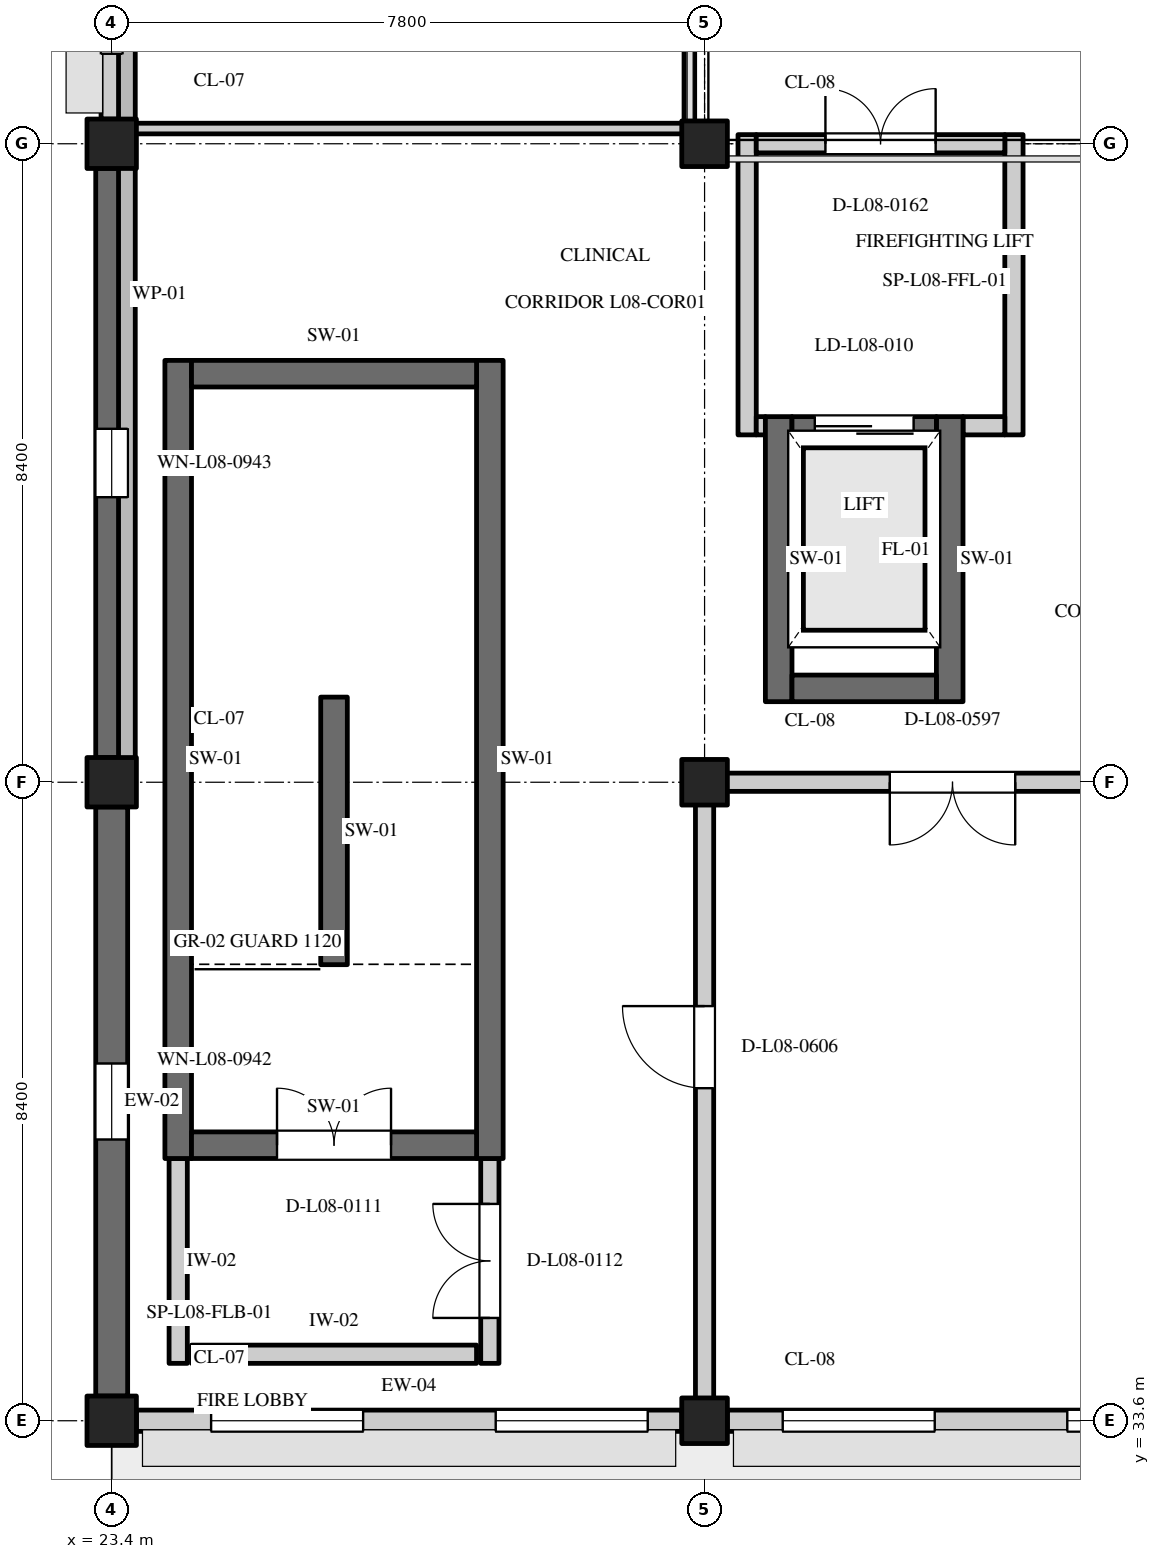
"""IFC4 building model, lengths in metres.
Left out: names, types, materials, properties, quantities, classifications, styles, units other than length and angle.
Written with IfcOpenShell. Run it as: python <this file> out.ifc"""

import sys

from ifc_helpers import new_model, si_unit, direction, frame, frame_2d, origin, origin_2d, place, context, subcontext, project, spatial, rectangle, extrude, element, fill, save


model = new_model("IFC4")
c1 = context("Model", 3, precision=1e-05, world=origin(), true_north=direction((0.0, 1.0)))
c2 = subcontext(c1, "Body", "Model", "MODEL_VIEW")
j1 = project(units=[si_unit("LENGTHUNIT", "METRE"), si_unit("PLANEANGLEUNIT", "RADIAN")], contexts=[c1])
p1 = place(None, origin())
s1 = spatial("IfcSite", under=j1, at=p1, CompositionType="ELEMENT")
p2 = place(p1, origin())
s2 = spatial("IfcBuilding", under=s1, at=p2, CompositionType="ELEMENT")
p3 = place(p2, frame((0.0, 0.0, 33.9)))
s3 = spatial("IfcBuildingStorey", under=s2, at=p3, CompositionType="ELEMENT", Elevation=33.9)
for number, where, z_axis, x_axis in (
    (1, (23.4, 33.6, 0.0), (0.0, 0.0, 1.0), (1.0, 0.0, 0.0)),
    (2, (23.4, 42.0, 0.0), (0.0, 0.0, 1.0), (1.0, 0.0, 0.0)),
    (3, (23.4, 50.4, 0.0), (0.0, 0.0, 1.0), (1.0, 0.0, 0.0)),
):
    element("IfcColumn", number, at=place(p3, frame(where, z_axis=z_axis, x_axis=x_axis)), inside=s3, PredefinedType="COLUMN", context=c2, shape_type="SweptSolid", body=[
        extrude(rectangle(XDim=0.65, YDim=0.65, at=origin_2d()), origin(), (0.0, 0.0, 1.0), 3.9),
    ])
for number, where, z_axis, x_axis in (
    (4, (31.2, 33.6, 0.0), (0.0, 0.0, 1.0), (1.0, 0.0, 0.0)),
    (5, (31.2, 42.0, 0.0), (0.0, 0.0, 1.0), (1.0, 0.0, 0.0)),
    (6, (31.2, 50.4, 0.0), (0.0, 0.0, 1.0), (1.0, 0.0, 0.0)),
):
    element("IfcColumn", number, at=place(p3, frame(where, z_axis=z_axis, x_axis=x_axis)), inside=s3, PredefinedType="COLUMN", context=c2, shape_type="SweptSolid", body=[
        extrude(rectangle(XDim=0.6, YDim=0.6, at=origin_2d()), origin(), (0.0, 0.0, 1.0), 3.9),
    ])
p4 = place(p3, frame((23.725, 33.6, 0.0), z_axis=(0.0, 0.0, 1.0), x_axis=(1.0, 0.0, 0.0)))
e7 = element("IfcWall", 7, at=p4, inside=s3, PredefinedType="STANDARD", context=c2, shape_type="SweptSolid", body=[
    extrude(rectangle(XDim=7.175, YDim=0.28, at=frame_2d((3.587, 0.0))), origin(), (0.0, 0.0, 1.0), 2.95),
])
p5 = place(p4, frame((0.983, 0.0, 0.8)))
e8 = element("IfcOpeningElement", 8, at=p5, cuts=e7, PredefinedType="OPENING", context=c2, shape_type="SweptSolid", body=[
    extrude(rectangle(XDim=2.0, YDim=1.75, at=frame_2d((1.0, 0.875))), frame((0.0, 0.152, 0.0), z_axis=(0.0, -1.0, 0.0), x_axis=(1.0, 0.0, 0.0)), (0.0, 0.0, 1.0), 0.304),
])
p6 = place(p4, frame((4.727, 0.0, 0.8)))
e9 = element("IfcOpeningElement", 9, at=p6, cuts=e7, PredefinedType="OPENING", context=c2, shape_type="SweptSolid", body=[
    extrude(rectangle(XDim=2.0, YDim=1.75, at=frame_2d((1.0, 0.875))), frame((0.0, 0.152, 0.0), z_axis=(0.0, -1.0, 0.0), x_axis=(1.0, 0.0, 0.0)), (0.0, 0.0, 1.0), 0.304),
])
p7 = place(p3, frame((31.5, 33.6, 0.0), z_axis=(0.0, 0.0, 1.0), x_axis=(1.0, 0.0, 0.0)))
e10 = element("IfcWall", 10, at=p7, inside=s3, PredefinedType="STANDARD", context=c2, shape_type="SweptSolid", body=[
    extrude(rectangle(XDim=7.2, YDim=0.28, at=frame_2d((3.6, 0.0))), origin(), (0.0, 0.0, 1.0), 2.95),
])
p8 = place(p7, frame((0.728, 0.0, 0.8)))
e11 = element("IfcOpeningElement", 11, at=p8, cuts=e10, PredefinedType="OPENING", context=c2, shape_type="SweptSolid", body=[
    extrude(rectangle(XDim=2.0, YDim=1.65, at=frame_2d((1.0, 0.825))), frame((0.0, 0.152, 0.0), z_axis=(0.0, -1.0, 0.0), x_axis=(1.0, 0.0, 0.0)), (0.0, 0.0, 1.0), 0.304),
])
p9 = place(p7, frame((4.472, 0.0, 0.8)))
e12 = element("IfcOpeningElement", 12, at=p9, cuts=e10, PredefinedType="OPENING", context=c2, shape_type="SweptSolid", body=[
    extrude(rectangle(XDim=2.0, YDim=1.65, at=frame_2d((1.0, 0.825))), frame((0.0, 0.152, 0.0), z_axis=(0.0, -1.0, 0.0), x_axis=(1.0, 0.0, 0.0)), (0.0, 0.0, 1.0), 0.304),
])
p10 = place(p3, frame((23.4, 33.925, 0.0), z_axis=(0.0, 0.0, 1.0), x_axis=(0.0, 1.0, 0.0)))
e13 = element("IfcWall", 13, at=p10, inside=s3, PredefinedType="SOLIDWALL", context=c2, shape_type="SweptSolid", body=[
    extrude(rectangle(XDim=7.75, YDim=0.42, at=frame_2d((3.875, 0.0))), origin(), (0.0, 0.0, 1.0), 2.95),
])
p11 = place(p10, frame((3.375, 0.0, 0.8)))
e14 = element("IfcOpeningElement", 14, at=p11, cuts=e13, PredefinedType="OPENING", context=c2, shape_type="SweptSolid", body=[
    extrude(rectangle(XDim=1.0, YDim=1.45, at=frame_2d((0.5, 0.725))), frame((0.0, 0.222, 0.0), z_axis=(0.0, -1.0, 0.0), x_axis=(1.0, 0.0, 0.0)), (0.0, 0.0, 1.0), 0.444),
])
p12 = place(p3, frame((23.4, 42.325, 0.0), z_axis=(0.0, 0.0, 1.0), x_axis=(0.0, 1.0, 0.0)))
e15 = element("IfcWall", 15, at=p12, inside=s3, PredefinedType="SOLIDWALL", context=c2, shape_type="SweptSolid", body=[
    extrude(rectangle(XDim=7.75, YDim=0.42, at=frame_2d((3.875, 0.0))), origin(), (0.0, 0.0, 1.0), 2.95),
])
p13 = place(p12, frame((3.425, 0.0, 0.8)))
e16 = element("IfcOpeningElement", 16, at=p13, cuts=e15, PredefinedType="OPENING", context=c2, shape_type="SweptSolid", body=[
    extrude(rectangle(XDim=0.9, YDim=1.3, at=frame_2d((0.45, 0.65))), frame((0.0, 0.222, 0.0), z_axis=(0.0, -1.0, 0.0), x_axis=(1.0, 0.0, 0.0)), (0.0, 0.0, 1.0), 0.444),
])
p14 = place(p3, frame((23.4, 50.725, 0.0), z_axis=(0.0, 0.0, 1.0), x_axis=(0.0, 1.0, 0.0)))
e17 = element("IfcWall", 17, at=p14, inside=s3, PredefinedType="STANDARD", context=c2, shape_type="SweptSolid", body=[
    extrude(rectangle(XDim=7.75, YDim=0.28, at=frame_2d((3.875, 0.0))), origin(), (0.0, 0.0, 1.0), 2.95),
])
p15 = place(p14, frame((0.859, 0.0, 0.8)))
e18 = element("IfcOpeningElement", 18, at=p15, cuts=e17, PredefinedType="OPENING", context=c2, shape_type="SweptSolid", body=[
    extrude(rectangle(XDim=2.0, YDim=1.55, at=frame_2d((1.0, 0.775))), frame((0.0, 0.152, 0.0), z_axis=(0.0, -1.0, 0.0), x_axis=(1.0, 0.0, 0.0)), (0.0, 0.0, 1.0), 0.304),
])
p16 = place(p14, frame((4.891, 0.0, 0.8)))
e19 = element("IfcOpeningElement", 19, at=p16, cuts=e17, PredefinedType="OPENING", context=c2, shape_type="SweptSolid", body=[
    extrude(rectangle(XDim=2.0, YDim=1.55, at=frame_2d((1.0, 0.775))), frame((0.0, 0.152, 0.0), z_axis=(0.0, -1.0, 0.0), x_axis=(1.0, 0.0, 0.0)), (0.0, 0.0, 1.0), 0.304),
])
p17 = place(p3, frame((23.6, 42.2, 3.9), z_axis=(0.0, 0.0, 1.0), x_axis=(0.0, 1.0, 0.0)))
e20 = element("IfcWall", 20, at=p17, inside=s3, PredefinedType="PARAPET", context=c2, shape_type="SweptSolid", body=[
    extrude(rectangle(XDim=16.4, YDim=0.22, at=frame_2d((8.2, 0.0))), origin(), (0.0, 0.0, 1.0), 1.15),
])
for number, where, z_axis, x_axis in (
    (21, (24.275, 37.05, 0.0), (0.0, 0.0, 1.0), (0.0, 1.0, 0.0)),
    (22, (28.375, 37.05, 0.0), (0.0, 0.0, 1.0), (0.0, 1.0, 0.0)),
):
    element("IfcWall", number, at=place(p3, frame(where, z_axis=z_axis, x_axis=x_axis)), inside=s3, PredefinedType="SHEAR", context=c2, shape_type="SweptSolid", body=[
        extrude(rectangle(XDim=10.5, YDim=0.35, at=frame_2d((5.25, 0.0))), origin(), (0.0, 0.0, 1.0), 3.6),
    ])
p18 = place(p3, frame((24.45, 47.375, 0.0), z_axis=(0.0, 0.0, 1.0), x_axis=(1.0, 0.0, 0.0)))
e23 = element("IfcWall", 23, at=p18, inside=s3, PredefinedType="SHEAR", context=c2, shape_type="SweptSolid", body=[
    extrude(rectangle(XDim=3.75, YDim=0.35, at=frame_2d((1.875, 0.0))), origin(), (0.0, 0.0, 1.0), 3.6),
])
p19 = place(p3, frame((24.45, 37.225, 0.0), z_axis=(0.0, 0.0, 1.0), x_axis=(1.0, 0.0, 0.0)))
e24 = element("IfcWall", 24, at=p19, inside=s3, PredefinedType="SHEAR", context=c2, shape_type="SweptSolid", body=[
    extrude(rectangle(XDim=3.75, YDim=0.35, at=frame_2d((1.875, 0.0))), origin(), (0.0, 0.0, 1.0), 3.6),
])
p20 = place(p19, frame((1.125, 0.0, 0.0)))
e25 = element("IfcOpeningElement", 25, at=p20, cuts=e24, PredefinedType="OPENING", context=c2, shape_type="SweptSolid", body=[
    extrude(rectangle(XDim=1.5, YDim=2.2, at=frame_2d((0.75, 1.1))), frame((0.0, 0.187, 0.0), z_axis=(0.0, -1.0, 0.0), x_axis=(1.0, 0.0, 0.0)), (0.0, 0.0, 1.0), 0.374),
])
p21 = place(p3, frame((24.275, 34.355, 0.0), z_axis=(0.0, 0.0, 1.0), x_axis=(0.0, 1.0, 0.0)))
e26 = element("IfcWall", 26, at=p21, inside=s3, PredefinedType="STANDARD", context=c2, shape_type="SweptSolid", body=[
    extrude(rectangle(XDim=2.695, YDim=0.24, at=frame_2d((1.348, 0.0))), origin(), (0.0, 0.0, 1.0), 3.6),
])
p22 = place(p3, frame((28.375, 34.355, 0.0), z_axis=(0.0, 0.0, 1.0), x_axis=(0.0, 1.0, 0.0)))
e27 = element("IfcWall", 27, at=p22, inside=s3, PredefinedType="STANDARD", context=c2, shape_type="SweptSolid", body=[
    extrude(rectangle(XDim=2.695, YDim=0.24, at=frame_2d((1.348, 0.0))), origin(), (0.0, 0.0, 1.0), 3.6),
])
p23 = place(p22, frame((0.597, 0.0, 0.0)))
e28 = element("IfcOpeningElement", 28, at=p23, cuts=e27, PredefinedType="OPENING", context=c2, shape_type="SweptSolid", body=[
    extrude(rectangle(XDim=1.5, YDim=2.2, at=frame_2d((0.75, 1.1))), frame((0.0, 0.132, 0.0), z_axis=(0.0, -1.0, 0.0), x_axis=(1.0, 0.0, 0.0)), (0.0, 0.0, 1.0), 0.264),
])
p24 = place(p3, frame((24.45, 34.475, 0.0), z_axis=(0.0, 0.0, 1.0), x_axis=(1.0, 0.0, 0.0)))
e29 = element("IfcWall", 29, at=p24, inside=s3, PredefinedType="STANDARD", context=c2, shape_type="SweptSolid", body=[
    extrude(rectangle(XDim=3.75, YDim=0.24, at=frame_2d((1.875, 0.0))), origin(), (0.0, 0.0, 1.0), 3.6),
])
p25 = place(p3, frame((26.325, 39.6, 0.0), z_axis=(0.0, 0.0, 1.0), x_axis=(0.0, 1.0, 0.0)))
e30 = element("IfcWall", 30, at=p25, inside=s3, PredefinedType="SHEAR", context=c2, shape_type="SweptSolid", body=[
    extrude(rectangle(XDim=3.52, YDim=0.35, at=frame_2d((1.76, 0.0))), origin(), (0.0, 0.0, 1.0), 3.6),
])
for number, where, z_axis, x_axis in (
    (31, (32.175, 43.06, 0.0), (0.0, 0.0, 1.0), (0.0, 1.0, 0.0)),
    (32, (34.425, 43.06, 0.0), (0.0, 0.0, 1.0), (0.0, 1.0, 0.0)),
):
    element("IfcWall", number, at=place(p3, frame(where, z_axis=z_axis, x_axis=x_axis)), inside=s3, PredefinedType="SHEAR", context=c2, shape_type="SweptSolid", body=[
        extrude(rectangle(XDim=3.75, YDim=0.35, at=frame_2d((1.875, 0.0))), origin(), (0.0, 0.0, 1.0), 3.6),
    ])
p26 = place(p3, frame((32.35, 43.235, 0.0), z_axis=(0.0, 0.0, 1.0), x_axis=(1.0, 0.0, 0.0)))
e33 = element("IfcWall", 33, at=p26, inside=s3, PredefinedType="SHEAR", context=c2, shape_type="SweptSolid", body=[
    extrude(rectangle(XDim=1.9, YDim=0.35, at=frame_2d((0.95, 0.0))), origin(), (0.0, 0.0, 1.0), 3.6),
])
p27 = place(p3, frame((32.35, 46.635, 0.0), z_axis=(0.0, 0.0, 1.0), x_axis=(1.0, 0.0, 0.0)))
e34 = element("IfcWall", 34, at=p27, inside=s3, PredefinedType="SHEAR", context=c2, shape_type="SweptSolid", body=[
    extrude(rectangle(XDim=1.9, YDim=0.35, at=frame_2d((0.95, 0.0))), origin(), (0.0, 0.0, 1.0), 3.6),
])
p28 = place(p27, frame((0.3, 0.0, 0.0)))
e35 = element("IfcOpeningElement", 35, at=p28, cuts=e34, PredefinedType="OPENING", context=c2, shape_type="SweptSolid", body=[
    extrude(rectangle(XDim=1.3, YDim=2.2, at=frame_2d((0.65, 1.1))), frame((0.0, 0.187, 0.0), z_axis=(0.0, -1.0, 0.0), x_axis=(1.0, 0.0, 0.0)), (0.0, 0.0, 1.0), 0.374),
])
for number, where, z_axis, x_axis in (
    (36, (31.76, 46.57, 0.0), (0.0, 0.0, 1.0), (0.0, 1.0, 0.0)),
    (37, (35.27, 46.57, 0.0), (0.0, 0.0, 1.0), (0.0, 1.0, 0.0)),
):
    element("IfcWall", number, at=place(p3, frame(where, z_axis=z_axis, x_axis=x_axis)), inside=s3, PredefinedType="STANDARD", context=c2, shape_type="SweptSolid", body=[
        extrude(rectangle(XDim=3.95, YDim=0.24, at=frame_2d((1.975, 0.0))), origin(), (0.0, 0.0, 1.0), 3.1),
    ])
p29 = place(p3, frame((31.88, 46.69, 0.0), z_axis=(0.0, 0.0, 1.0), x_axis=(1.0, 0.0, 0.0)))
e38 = element("IfcWall", 38, at=p29, inside=s3, PredefinedType="STANDARD", context=c2, shape_type="SweptSolid", body=[
    extrude(rectangle(XDim=0.12, YDim=0.24, at=frame_2d((0.06, 0.0))), origin(), (0.0, 0.0, 1.0), 3.1),
])
p30 = place(p3, frame((34.6, 46.69, 0.0), z_axis=(0.0, 0.0, 1.0), x_axis=(1.0, 0.0, 0.0)))
e39 = element("IfcWall", 39, at=p30, inside=s3, PredefinedType="STANDARD", context=c2, shape_type="SweptSolid", body=[
    extrude(rectangle(XDim=0.55, YDim=0.24, at=frame_2d((0.275, 0.0))), origin(), (0.0, 0.0, 1.0), 3.1),
])
p31 = place(p3, frame((31.88, 50.4, 0.0), z_axis=(0.0, 0.0, 1.0), x_axis=(1.0, 0.0, 0.0)))
e40 = element("IfcWall", 40, at=p31, inside=s3, PredefinedType="STANDARD", context=c2, shape_type="SweptSolid", body=[
    extrude(rectangle(XDim=3.27, YDim=0.24, at=frame_2d((1.635, 0.0))), origin(), (0.0, 0.0, 1.0), 3.1),
])
p32 = place(p31, frame((0.91, 0.0, 0.0)))
e41 = element("IfcOpeningElement", 41, at=p32, cuts=e40, PredefinedType="OPENING", context=c2, shape_type="SweptSolid", body=[
    extrude(rectangle(XDim=1.45, YDim=2.2, at=frame_2d((0.725, 1.1))), frame((0.0, 0.132, 0.0), z_axis=(0.0, -1.0, 0.0), x_axis=(1.0, 0.0, 0.0)), (0.0, 0.0, 1.0), 0.264),
])
p33 = place(p3, frame((31.0, 50.685, 0.0), z_axis=(0.0, 0.0, 1.0), x_axis=(0.0, 1.0, 0.0)))
e42 = element("IfcWall", 42, at=p33, inside=s3, PredefinedType="PARTITIONING", context=c2, shape_type="SweptSolid", body=[
    extrude(rectangle(XDim=3.36, YDim=0.14, at=frame_2d((1.68, 0.0))), origin(), (0.0, 0.0, 1.0), 3.58),
])
p34 = place(p33, frame((1.89, 0.0, 0.0)))
e43 = element("IfcOpeningElement", 43, at=p34, cuts=e42, PredefinedType="OPENING", context=c2, shape_type="SweptSolid", body=[
    extrude(rectangle(XDim=1.22, YDim=2.15, at=frame_2d((0.61, 1.075))), frame((0.0, 0.082, 0.0), z_axis=(0.0, -1.0, 0.0), x_axis=(1.0, 0.0, 0.0)), (0.0, 0.0, 1.0), 0.164),
])
p35 = place(p3, frame((23.485, 50.6, 0.0), z_axis=(0.0, 0.0, 1.0), x_axis=(1.0, 0.0, 0.0)))
e44 = element("IfcWall", 44, at=p35, inside=s3, PredefinedType="PARTITIONING", context=c2, shape_type="SweptSolid", body=[
    extrude(rectangle(XDim=7.43, YDim=0.14, at=frame_2d((3.715, 0.0))), origin(), (0.0, 0.0, 1.0), 2.95),
])
p36 = place(p3, frame((31.31, 42.0, 0.0), z_axis=(0.0, 0.0, 1.0), x_axis=(1.0, 0.0, 0.0)))
e45 = element("IfcWall", 45, at=p36, inside=s3, PredefinedType="STANDARD", context=c2, shape_type="SweptSolid", body=[
    extrude(rectangle(XDim=17.38, YDim=0.24, at=frame_2d((8.69, 0.0))), origin(), (0.0, 0.0, 1.0), 3.58),
])
p37 = place(p36, frame((2.327, 0.0, 0.0)))
e46 = element("IfcOpeningElement", 46, at=p37, cuts=e45, PredefinedType="OPENING", context=c2, shape_type="SweptSolid", body=[
    extrude(rectangle(XDim=1.65, YDim=2.25, at=frame_2d((0.825, 1.125))), frame((0.0, 0.132, 0.0), z_axis=(0.0, -1.0, 0.0), x_axis=(1.0, 0.0, 0.0)), (0.0, 0.0, 1.0), 0.264),
])
p38 = place(p3, frame((31.2, 33.71, 0.0), z_axis=(0.0, 0.0, 1.0), x_axis=(0.0, 1.0, 0.0)))
e47 = element("IfcWall", 47, at=p38, inside=s3, PredefinedType="STANDARD", context=c2, shape_type="SweptSolid", body=[
    extrude(rectangle(XDim=8.18, YDim=0.24, at=frame_2d((4.09, 0.0))), origin(), (0.0, 0.0, 1.0), 3.58),
])
p39 = place(p38, frame((4.265, 0.0, 0.0)))
e48 = element("IfcOpeningElement", 48, at=p39, cuts=e47, PredefinedType="OPENING", context=c2, shape_type="SweptSolid", body=[
    extrude(rectangle(XDim=1.08, YDim=2.15, at=frame_2d((0.54, 1.075))), frame((0.0, 0.132, 0.0), z_axis=(0.0, -1.0, 0.0), x_axis=(1.0, 0.0, 0.0)), (0.0, 0.0, 1.0), 0.264),
])
p40 = place(p5, origin())
e49 = element("IfcWindow", 49, at=p40, inside=s3, PartitioningType="DOUBLE_PANEL_VERTICAL", PredefinedType="WINDOW", context=c2, shape_type="SweptSolid", body=[
    extrude(rectangle(XDim=2.0, YDim=1.75, at=frame_2d((1.0, 0.875))), frame((0.0, 0.03, 0.0), z_axis=(0.0, -1.0, 0.0), x_axis=(1.0, 0.0, 0.0)), (0.0, 0.0, 1.0), 0.06),
])
fill(e8, e49)
p41 = place(p6, origin())
e50 = element("IfcWindow", 50, at=p41, inside=s3, PartitioningType="DOUBLE_PANEL_VERTICAL", PredefinedType="WINDOW", context=c2, shape_type="SweptSolid", body=[
    extrude(rectangle(XDim=2.0, YDim=1.75, at=frame_2d((1.0, 0.875))), frame((0.0, 0.03, 0.0), z_axis=(0.0, -1.0, 0.0), x_axis=(1.0, 0.0, 0.0)), (0.0, 0.0, 1.0), 0.06),
])
fill(e9, e50)
p42 = place(p8, origin())
e51 = element("IfcWindow", 51, at=p42, inside=s3, PartitioningType="DOUBLE_PANEL_VERTICAL", PredefinedType="WINDOW", context=c2, shape_type="SweptSolid", body=[
    extrude(rectangle(XDim=2.0, YDim=1.65, at=frame_2d((1.0, 0.825))), frame((0.0, 0.03, 0.0), z_axis=(0.0, -1.0, 0.0), x_axis=(1.0, 0.0, 0.0)), (0.0, 0.0, 1.0), 0.06),
])
fill(e11, e51)
p43 = place(p9, origin())
e52 = element("IfcWindow", 52, at=p43, inside=s3, PartitioningType="DOUBLE_PANEL_VERTICAL", PredefinedType="WINDOW", context=c2, shape_type="SweptSolid", body=[
    extrude(rectangle(XDim=2.0, YDim=1.65, at=frame_2d((1.0, 0.825))), frame((0.0, 0.03, 0.0), z_axis=(0.0, -1.0, 0.0), x_axis=(1.0, 0.0, 0.0)), (0.0, 0.0, 1.0), 0.06),
])
fill(e12, e52)
p44 = place(p11, origin())
e53 = element("IfcWindow", 53, at=p44, inside=s3, PartitioningType="SINGLE_PANEL", PredefinedType="WINDOW", context=c2, shape_type="SweptSolid", body=[
    extrude(rectangle(XDim=1.0, YDim=1.45, at=frame_2d((0.5, 0.725))), frame((0.0, 0.03, 0.0), z_axis=(0.0, -1.0, 0.0), x_axis=(1.0, 0.0, 0.0)), (0.0, 0.0, 1.0), 0.06),
])
fill(e14, e53)
p45 = place(p13, origin())
e54 = element("IfcWindow", 54, at=p45, inside=s3, PartitioningType="SINGLE_PANEL", PredefinedType="WINDOW", context=c2, shape_type="SweptSolid", body=[
    extrude(rectangle(XDim=0.9, YDim=1.3, at=frame_2d((0.45, 0.65))), frame((0.0, 0.03, 0.0), z_axis=(0.0, -1.0, 0.0), x_axis=(1.0, 0.0, 0.0)), (0.0, 0.0, 1.0), 0.06),
])
fill(e16, e54)
p46 = place(p15, origin())
e55 = element("IfcWindow", 55, at=p46, inside=s3, PartitioningType="DOUBLE_PANEL_VERTICAL", PredefinedType="WINDOW", context=c2, shape_type="SweptSolid", body=[
    extrude(rectangle(XDim=2.0, YDim=1.55, at=frame_2d((1.0, 0.775))), frame((0.0, 0.03, 0.0), z_axis=(0.0, -1.0, 0.0), x_axis=(1.0, 0.0, 0.0)), (0.0, 0.0, 1.0), 0.06),
])
fill(e18, e55)
p47 = place(p20, origin())
e56 = element("IfcDoor", 56, at=p47, inside=s3, OperationType="DOUBLE_DOOR_SINGLE_SWING", PredefinedType="DOOR", context=c2, shape_type="SweptSolid", body=[
    extrude(rectangle(XDim=1.5, YDim=2.2, at=frame_2d((0.75, 1.1))), frame((0.0, 0.025, 0.0), z_axis=(0.0, -1.0, 0.0), x_axis=(1.0, 0.0, 0.0)), (0.0, 0.0, 1.0), 0.05),
])
fill(e25, e56)
p48 = place(p23, origin())
e57 = element("IfcDoor", 57, at=p48, inside=s3, OperationType="DOUBLE_DOOR_SINGLE_SWING", PredefinedType="DOOR", context=c2, shape_type="SweptSolid", body=[
    extrude(rectangle(XDim=1.5, YDim=2.2, at=frame_2d((0.75, 1.1))), frame((0.0, 0.025, 0.0), z_axis=(0.0, -1.0, 0.0), x_axis=(1.0, 0.0, 0.0)), (0.0, 0.0, 1.0), 0.05),
])
fill(e28, e57)
p49 = place(p28, origin())
e58 = element("IfcDoor", 58, at=p49, inside=s3, OperationType="SLIDING_TO_LEFT", PredefinedType="DOOR", context=c2, shape_type="SweptSolid", body=[
    extrude(rectangle(XDim=1.3, YDim=2.2, at=frame_2d((0.65, 1.1))), frame((0.0, 0.025, 0.0), z_axis=(0.0, -1.0, 0.0), x_axis=(1.0, 0.0, 0.0)), (0.0, 0.0, 1.0), 0.05),
])
fill(e35, e58)
p50 = place(p32, origin())
e59 = element("IfcDoor", 59, at=p50, inside=s3, OperationType="DOUBLE_DOOR_SINGLE_SWING", PredefinedType="DOOR", context=c2, shape_type="SweptSolid", body=[
    extrude(rectangle(XDim=1.45, YDim=2.2, at=frame_2d((0.725, 1.1))), frame((0.0, 0.025, 0.0), z_axis=(0.0, -1.0, 0.0), x_axis=(1.0, 0.0, 0.0)), (0.0, 0.0, 1.0), 0.05),
])
fill(e41, e59)
p51 = place(p37, frame((1.65, 0.0, 0.0), z_axis=(0.0, 0.0, 1.0), x_axis=(-1.0, 0.0, 0.0)))
e60 = element("IfcDoor", 60, at=p51, inside=s3, OperationType="DOUBLE_DOOR_SINGLE_SWING", PredefinedType="DOOR", context=c2, shape_type="SweptSolid", body=[
    extrude(rectangle(XDim=1.65, YDim=2.25, at=frame_2d((0.825, 1.125))), frame((0.0, 0.025, 0.0), z_axis=(0.0, -1.0, 0.0), x_axis=(1.0, 0.0, 0.0)), (0.0, 0.0, 1.0), 0.05),
])
fill(e46, e60)
p52 = place(p39, frame((1.08, 0.0, 0.0), z_axis=(0.0, 0.0, 1.0), x_axis=(-1.0, 0.0, 0.0)))
e61 = element("IfcDoor", 61, at=p52, inside=s3, OperationType="SINGLE_SWING_LEFT", PredefinedType="DOOR", context=c2, shape_type="SweptSolid", body=[
    extrude(rectangle(XDim=1.08, YDim=2.15, at=frame_2d((0.54, 1.075))), frame((0.0, 0.025, 0.0), z_axis=(0.0, -1.0, 0.0), x_axis=(1.0, 0.0, 0.0)), (0.0, 0.0, 1.0), 0.05),
])
fill(e48, e61)
save(model, sys.argv[1])
